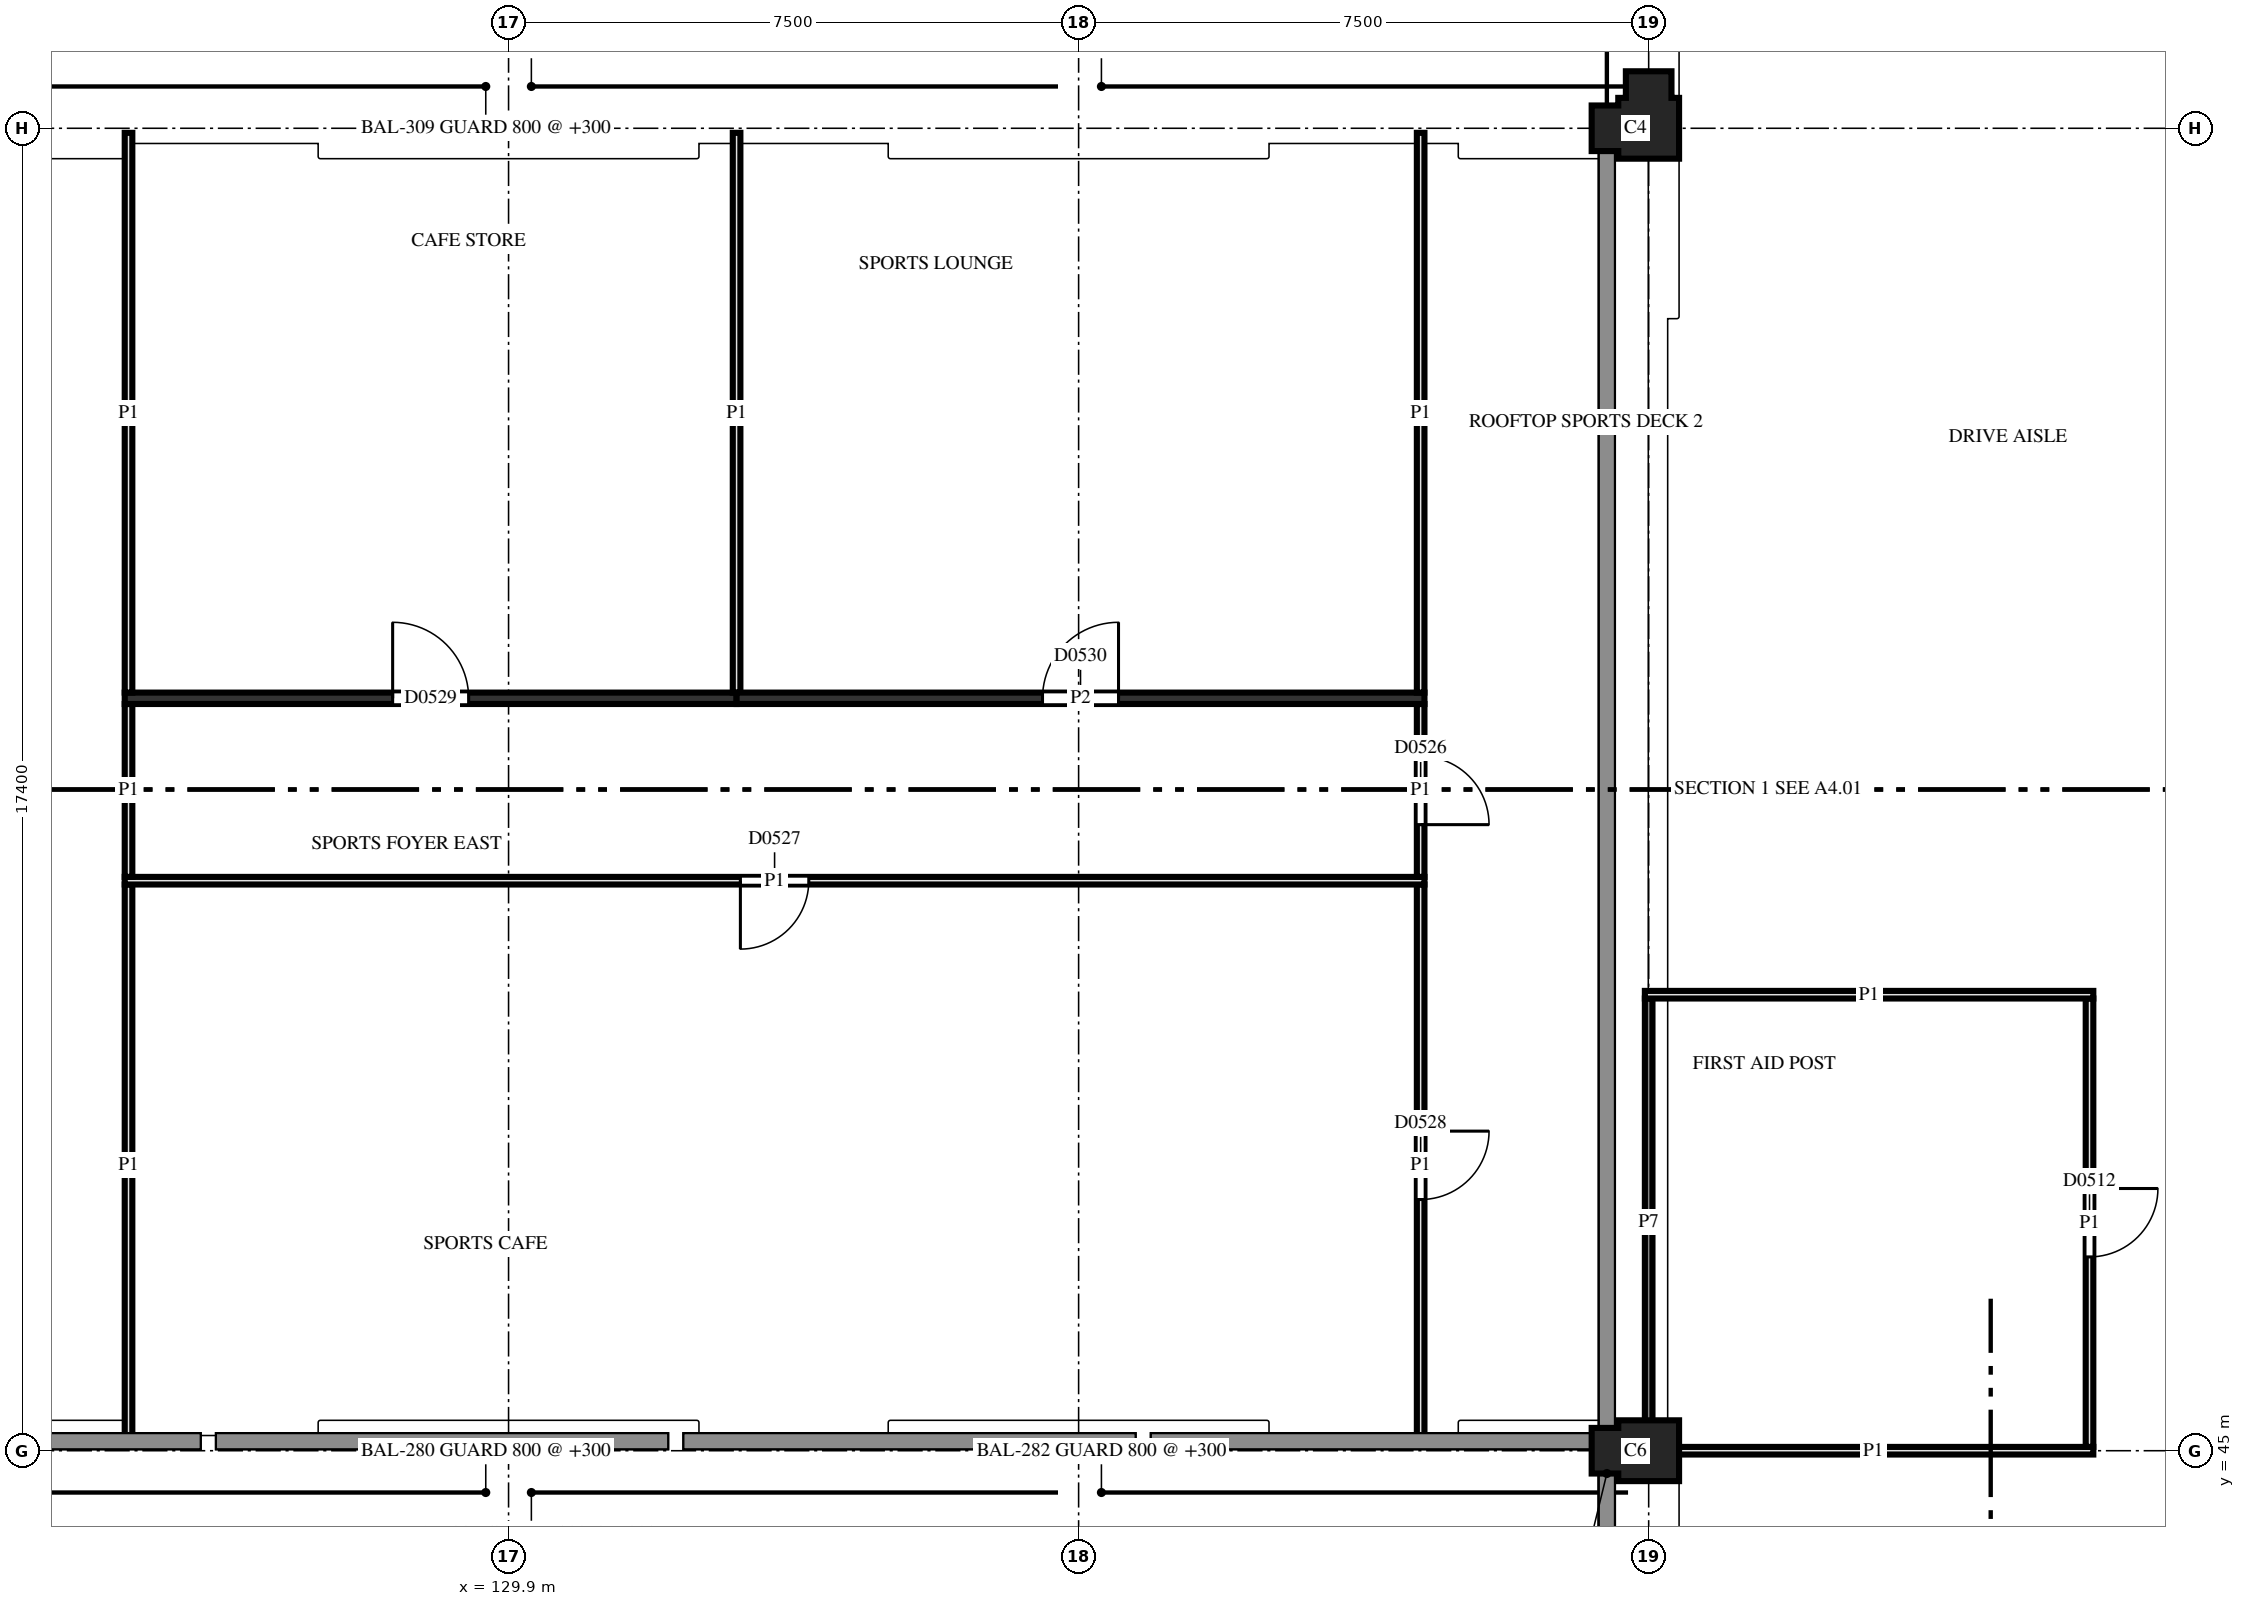
"""IFC4 building model, lengths in metres.
Left out: names, types, materials, properties, quantities, classifications, styles, units other than length and angle.
Written with IfcOpenShell. Run it as: python <this file> out.ifc"""

import sys

from ifc_helpers import new_model, si_unit, direction, frame, frame_2d, origin, place, context, subcontext, project, spatial, polyline, rectangle, outline, extrude, element, fill, save


model = new_model("IFC4")
c1 = context("Model", 3, precision=1e-05, world=origin(), true_north=direction((0.0, 1.0)))
c2 = subcontext(c1, "Body", "Model", "MODEL_VIEW")
j1 = project(units=[si_unit("LENGTHUNIT", "METRE"), si_unit("PLANEANGLEUNIT", "RADIAN")], contexts=[c1])
p1 = place(None, origin())
s1 = spatial("IfcSite", under=j1, at=p1, CompositionType="ELEMENT")
p2 = place(p1, origin())
s2 = spatial("IfcBuilding", under=s1, at=p2, CompositionType="ELEMENT")
p3 = place(p2, frame((0.0, 0.0, 19.3)))
s3 = spatial("IfcBuildingStorey", under=s2, at=p3, CompositionType="ELEMENT", Elevation=19.3)
p4 = place(p3, frame((144.9, 45.0, 0.0), z_axis=(0.0, 0.0, 1.0), x_axis=(-1.0, 0.0, 0.0)))
e1 = element("IfcColumn", 1, at=p4, inside=s3, PredefinedType="COLUMN", context=c2, shape_type="SweptSolid", body=[
    extrude(outline(polyline([(-0.4, -0.4), (0.4, -0.4), (0.4, -0.3), (0.75, -0.3), (0.75, 0.3), (0.4, 0.3), (0.4, 0.4), (-0.4, 0.4), (-0.4, -0.4)])), origin(), (0.0, 0.0, 1.0), 3.7),
])
p5 = place(p3, frame((144.9, 62.4, 0.0), z_axis=(0.0, 0.0, 1.0), x_axis=(0.0, 1.0, 0.0)))
e2 = element("IfcColumn", 2, at=p5, inside=s3, PredefinedType="COLUMN", context=c2, shape_type="SweptSolid", body=[
    extrude(outline(polyline([(-0.4, -0.4), (0.4, -0.4), (0.4, -0.3), (0.75, -0.3), (0.75, 0.3), (0.4, 0.3), (0.4, 0.4), (0.3, 0.4), (0.3, 0.75), (-0.3, 0.75), (-0.3, 0.4), (-0.4, 0.4), (-0.4, -0.4)])), origin(), (0.0, 0.0, 1.0), 3.7),
])
p6 = place(p3, frame((144.96, 45.0, 0.0), z_axis=(0.0, 0.0, 1.0), x_axis=(1.0, 0.0, 0.0)))
e3 = element("IfcWall", 3, at=p6, inside=s3, PredefinedType="PARTITIONING", context=c2, shape_type="SweptSolid", body=[
    extrude(rectangle(XDim=5.79, YDim=0.1, at=frame_2d((2.895, 0.0))), origin(), (0.0, 0.0, 1.0), 2.88),
])
p7 = place(p3, frame((150.7, 45.05, 0.0), z_axis=(0.0, 0.0, 1.0), x_axis=(0.0, 1.0, 0.0)))
e4 = element("IfcWall", 4, at=p7, inside=s3, PredefinedType="PARTITIONING", context=c2, shape_type="SweptSolid", body=[
    extrude(rectangle(XDim=5.9, YDim=0.1, at=frame_2d((2.95, 0.0))), origin(), (0.0, 0.0, 1.0), 2.88),
])
p8 = place(p7, frame((2.5, 0.0, 0.0)))
e5 = element("IfcOpeningElement", 5, at=p8, cuts=e4, PredefinedType="OPENING", context=c2, shape_type="SweptSolid", body=[
    extrude(rectangle(XDim=0.9, YDim=2.1, at=frame_2d((0.45, 1.05))), frame((0.0, 0.06, 0.0), z_axis=(0.0, -1.0, 0.0), x_axis=(1.0, 0.0, 0.0)), (0.0, 0.0, 1.0), 0.12),
])
p9 = place(p3, frame((141.9, 45.06, 0.0), z_axis=(0.0, 0.0, 1.0), x_axis=(0.0, 1.0, 0.0)))
e6 = element("IfcWall", 6, at=p9, inside=s3, PredefinedType="PARTITIONING", context=c2, shape_type="SweptSolid", body=[
    extrude(rectangle(XDim=7.39, YDim=0.1, at=frame_2d((3.695, 0.0))), origin(), (0.0, 0.0, 1.0), 2.88),
])
p10 = place(p9, frame((3.245, 0.0, 0.0)))
e7 = element("IfcOpeningElement", 7, at=p10, cuts=e6, PredefinedType="OPENING", context=c2, shape_type="SweptSolid", body=[
    extrude(rectangle(XDim=0.9, YDim=2.1, at=frame_2d((0.45, 1.05))), frame((0.0, 0.06, 0.0), z_axis=(0.0, -1.0, 0.0), x_axis=(1.0, 0.0, 0.0)), (0.0, 0.0, 1.0), 0.12),
])
p11 = place(p3, frame((144.9, 50.95, 0.0), z_axis=(0.0, 0.0, 1.0), x_axis=(0.0, -1.0, 0.0)))
e8 = element("IfcWall", 8, at=p11, inside=s3, PredefinedType="PARTITIONING", context=c2, shape_type="SweptSolid", body=[
    extrude(rectangle(XDim=5.89, YDim=0.1, at=frame_2d((2.945, 0.0))), origin(), (0.0, 0.0, 1.0), 2.2),
])
p12 = place(p3, frame((150.75, 51.0, 0.0), z_axis=(0.0, 0.0, 1.0), x_axis=(-1.0, 0.0, 0.0)))
e9 = element("IfcWall", 9, at=p12, inside=s3, PredefinedType="PARTITIONING", context=c2, shape_type="SweptSolid", body=[
    extrude(rectangle(XDim=5.9, YDim=0.1, at=frame_2d((2.95, 0.0))), origin(), (0.0, 0.0, 1.0), 2.88),
])
p13 = place(p3, frame((124.9, 52.45, 0.0), z_axis=(0.0, 0.0, 1.0), x_axis=(0.0, -1.0, 0.0)))
e10 = element("IfcWall", 10, at=p13, inside=s3, PredefinedType="PARTITIONING", context=c2, shape_type="SweptSolid", body=[
    extrude(rectangle(XDim=7.39, YDim=0.1, at=frame_2d((3.695, 0.0))), origin(), (0.0, 0.0, 1.0), 2.88),
])
p14 = place(p3, frame((124.85, 52.5, 0.0), z_axis=(0.0, 0.0, 1.0), x_axis=(1.0, 0.0, 0.0)))
e11 = element("IfcWall", 11, at=p14, inside=s3, PredefinedType="PARTITIONING", context=c2, shape_type="SweptSolid", body=[
    extrude(rectangle(XDim=17.1, YDim=0.1, at=frame_2d((8.55, 0.0))), origin(), (0.0, 0.0, 1.0), 2.88),
])
p15 = place(p14, frame((8.1, 0.0, 0.0)))
e12 = element("IfcOpeningElement", 12, at=p15, cuts=e11, PredefinedType="OPENING", context=c2, shape_type="SweptSolid", body=[
    extrude(rectangle(XDim=0.9, YDim=2.1, at=frame_2d((0.45, 1.05))), frame((0.0, 0.06, 0.0), z_axis=(0.0, -1.0, 0.0), x_axis=(1.0, 0.0, 0.0)), (0.0, 0.0, 1.0), 0.12),
])
p16 = place(p3, frame((141.9, 52.55, 0.0), z_axis=(0.0, 0.0, 1.0), x_axis=(0.0, 1.0, 0.0)))
e13 = element("IfcWall", 13, at=p16, inside=s3, PredefinedType="PARTITIONING", context=c2, shape_type="SweptSolid", body=[
    extrude(rectangle(XDim=2.275, YDim=0.1, at=frame_2d((1.137, 0.0))), origin(), (0.0, 0.0, 1.0), 2.88),
])
p17 = place(p16, frame((0.688, 0.0, 0.0)))
e14 = element("IfcOpeningElement", 14, at=p17, cuts=e13, PredefinedType="OPENING", context=c2, shape_type="SweptSolid", body=[
    extrude(rectangle(XDim=0.9, YDim=2.1, at=frame_2d((0.45, 1.05))), frame((0.0, 0.06, 0.0), z_axis=(0.0, -1.0, 0.0), x_axis=(1.0, 0.0, 0.0)), (0.0, 0.0, 1.0), 0.12),
])
p18 = place(p3, frame((124.9, 54.825, 0.0), z_axis=(0.0, 0.0, 1.0), x_axis=(0.0, -1.0, 0.0)))
e15 = element("IfcWall", 15, at=p18, inside=s3, PredefinedType="PARTITIONING", context=c2, shape_type="SweptSolid", body=[
    extrude(rectangle(XDim=2.275, YDim=0.1, at=frame_2d((1.137, 0.0))), origin(), (0.0, 0.0, 1.0), 2.88),
])
p19 = place(p3, frame((132.9, 54.9, 0.0), z_axis=(0.0, 0.0, 1.0), x_axis=(-1.0, 0.0, 0.0)))
e16 = element("IfcWall", 16, at=p19, inside=s3, PredefinedType="PARTITIONING", context=c2, shape_type="SweptSolid", body=[
    extrude(rectangle(XDim=8.05, YDim=0.15, at=frame_2d((4.025, 0.0))), origin(), (0.0, 0.0, 1.0), 2.88),
])
p20 = place(p19, frame((3.525, 0.0, 0.0)))
e17 = element("IfcOpeningElement", 17, at=p20, cuts=e16, PredefinedType="OPENING", context=c2, shape_type="SweptSolid", body=[
    extrude(rectangle(XDim=1.0, YDim=2.1, at=frame_2d((0.5, 1.05))), frame((0.0, 0.085, 0.0), z_axis=(0.0, -1.0, 0.0), x_axis=(1.0, 0.0, 0.0)), (0.0, 0.0, 1.0), 0.17),
])
p21 = place(p3, frame((132.9, 54.975, 0.0), z_axis=(0.0, 0.0, 1.0), x_axis=(0.0, 1.0, 0.0)))
e18 = element("IfcWall", 18, at=p21, inside=s3, PredefinedType="PARTITIONING", context=c2, shape_type="SweptSolid", body=[
    extrude(rectangle(XDim=7.365, YDim=0.1, at=frame_2d((3.683, 0.0))), origin(), (0.0, 0.0, 1.0), 2.88),
])
p22 = place(p3, frame((141.95, 54.9, 0.0), z_axis=(0.0, 0.0, 1.0), x_axis=(-1.0, 0.0, 0.0)))
e19 = element("IfcWall", 19, at=p22, inside=s3, PredefinedType="PARTITIONING", context=c2, shape_type="SweptSolid", body=[
    extrude(rectangle(XDim=9.05, YDim=0.15, at=frame_2d((4.525, 0.0))), origin(), (0.0, 0.0, 1.0), 2.88),
])
p23 = place(p22, frame((4.025, 0.0, 0.0)))
e20 = element("IfcOpeningElement", 20, at=p23, cuts=e19, PredefinedType="OPENING", context=c2, shape_type="SweptSolid", body=[
    extrude(rectangle(XDim=1.0, YDim=2.1, at=frame_2d((0.5, 1.05))), frame((0.0, 0.085, 0.0), z_axis=(0.0, -1.0, 0.0), x_axis=(1.0, 0.0, 0.0)), (0.0, 0.0, 1.0), 0.17),
])
for number, where, z_axis, x_axis in (
    (21, (141.9, 54.975, 0.0), (0.0, 0.0, 1.0), (0.0, 1.0, 0.0)),
    (22, (124.9, 62.34, 0.0), (0.0, 0.0, 1.0), (0.0, -1.0, 0.0)),
):
    element("IfcWall", number, at=place(p3, frame(where, z_axis=z_axis, x_axis=x_axis)), inside=s3, PredefinedType="PARTITIONING", context=c2, shape_type="SweptSolid", body=[
        extrude(rectangle(XDim=7.365, YDim=0.1, at=frame_2d((3.683, 0.0))), origin(), (0.0, 0.0, 1.0), 2.88),
    ])
p24 = place(p8, origin())
e23 = element("IfcDoor", 23, at=p24, inside=s3, OperationType="SINGLE_SWING_RIGHT", PredefinedType="DOOR", context=c2, shape_type="SweptSolid", body=[
    extrude(rectangle(XDim=0.9, YDim=2.1, at=frame_2d((0.45, 1.05))), frame((0.0, 0.025, 0.0), z_axis=(0.0, -1.0, 0.0), x_axis=(1.0, 0.0, 0.0)), (0.0, 0.0, 1.0), 0.05),
])
fill(e5, e23)
p25 = place(p17, frame((0.9, 0.0, 0.0), z_axis=(0.0, 0.0, 1.0), x_axis=(-1.0, 0.0, 0.0)))
e24 = element("IfcDoor", 24, at=p25, inside=s3, OperationType="SINGLE_SWING_LEFT", PredefinedType="DOOR", context=c2, shape_type="SweptSolid", body=[
    extrude(rectangle(XDim=0.9, YDim=2.1, at=frame_2d((0.45, 1.05))), frame((0.0, 0.025, 0.0), z_axis=(0.0, -1.0, 0.0), x_axis=(1.0, 0.0, 0.0)), (0.0, 0.0, 1.0), 0.05),
])
fill(e14, e24)
p26 = place(p15, origin())
e25 = element("IfcDoor", 25, at=p26, inside=s3, OperationType="SINGLE_SWING_LEFT", PredefinedType="DOOR", context=c2, shape_type="SweptSolid", body=[
    extrude(rectangle(XDim=0.9, YDim=2.1, at=frame_2d((0.45, 1.05))), frame((0.0, 0.025, 0.0), z_axis=(0.0, -1.0, 0.0), x_axis=(1.0, 0.0, 0.0)), (0.0, 0.0, 1.0), 0.05),
])
fill(e12, e25)
p27 = place(p10, frame((0.9, 0.0, 0.0), z_axis=(0.0, 0.0, 1.0), x_axis=(-1.0, 0.0, 0.0)))
e26 = element("IfcDoor", 26, at=p27, inside=s3, OperationType="SINGLE_SWING_RIGHT", PredefinedType="DOOR", context=c2, shape_type="SweptSolid", body=[
    extrude(rectangle(XDim=0.9, YDim=2.1, at=frame_2d((0.45, 1.05))), frame((0.0, 0.025, 0.0), z_axis=(0.0, -1.0, 0.0), x_axis=(1.0, 0.0, 0.0)), (0.0, 0.0, 1.0), 0.05),
])
fill(e7, e26)
p28 = place(p20, origin())
e27 = element("IfcDoor", 27, at=p28, inside=s3, OperationType="SINGLE_SWING_RIGHT", PredefinedType="DOOR", context=c2, shape_type="SweptSolid", body=[
    extrude(rectangle(XDim=1.0, YDim=2.1, at=frame_2d((0.5, 1.05))), frame((0.0, 0.025, 0.0), z_axis=(0.0, -1.0, 0.0), x_axis=(1.0, 0.0, 0.0)), (0.0, 0.0, 1.0), 0.05),
])
fill(e17, e27)
p29 = place(p23, origin())
e28 = element("IfcDoor", 28, at=p29, inside=s3, OperationType="SINGLE_SWING_LEFT", PredefinedType="DOOR", context=c2, shape_type="SweptSolid", body=[
    extrude(rectangle(XDim=1.0, YDim=2.1, at=frame_2d((0.5, 1.05))), frame((0.0, 0.025, 0.0), z_axis=(0.0, -1.0, 0.0), x_axis=(1.0, 0.0, 0.0)), (0.0, 0.0, 1.0), 0.05),
])
fill(e20, e28)
save(model, sys.argv[1])
